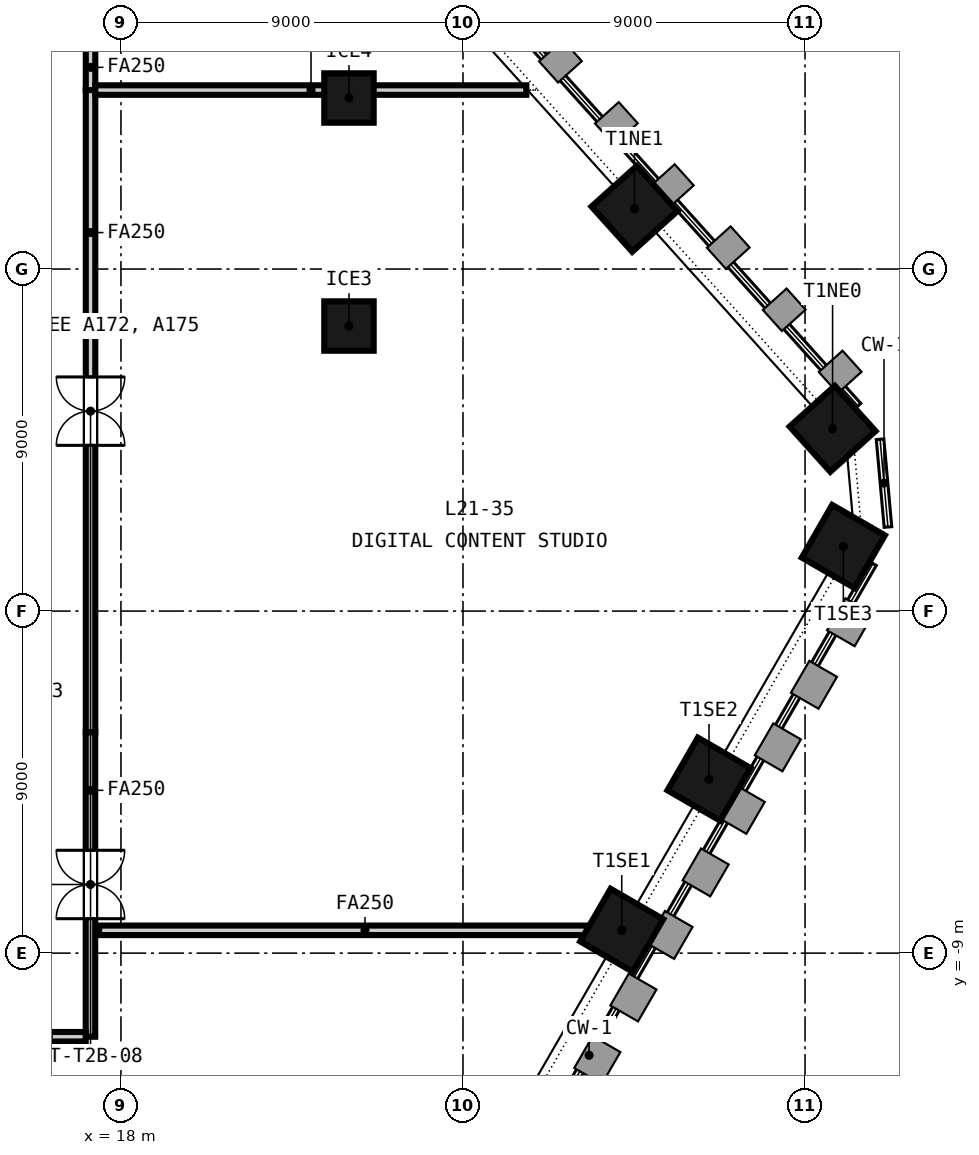
"""IFC4 building model, lengths in metres.
Left out: names, types, materials, properties, quantities, classifications, styles, units other than length and angle.
Written with IfcOpenShell. Run it as: python <this file> out.ifc"""

import sys

from ifc_helpers import new_model, si_unit, direction, frame, frame_2d, origin, origin_2d, place, context, subcontext, project, spatial, rectangle, extrude, element, fill, save


model = new_model("IFC4")
c1 = context("Model", 3, precision=1e-05, world=origin(), true_north=direction((0.0, 1.0)))
c2 = subcontext(c1, "Body", "Model", "MODEL_VIEW")
j1 = project(units=[si_unit("LENGTHUNIT", "METRE"), si_unit("PLANEANGLEUNIT", "RADIAN")], contexts=[c1])
p1 = place(None, origin())
s1 = spatial("IfcSite", under=j1, at=p1, CompositionType="ELEMENT")
p2 = place(p1, origin())
s2 = spatial("IfcBuilding", under=s1, at=p2, CompositionType="ELEMENT")
p3 = place(p2, frame((0.0, 0.0, 91.6)))
s3 = spatial("IfcBuildingStorey", under=s2, at=p3, CompositionType="ELEMENT", Elevation=91.6)
for number, where, z_axis, x_axis in (
    (1, (31.177, -8.4, -0.15), (0.0, 0.0, 1.0), (0.5, 0.866, 0.0)),
    (2, (33.473, -4.422, -0.15), (0.0, 0.0, 1.0), (0.5, 0.866, 0.0)),
    (3, (37.008, 1.7, -0.15), (0.0, 0.0, 1.0), (0.5, 0.866, 0.0)),
    (4, (36.725, 4.795, -0.15), (0.0, 0.0, 1.0), (-0.669, 0.743, 0.0)),
    (5, (31.513, 10.584, -0.15), (0.0, 0.0, 1.0), (-0.669, 0.743, 0.0)),
):
    element("IfcColumn", number, at=place(p3, frame(where, z_axis=z_axis, x_axis=x_axis)), inside=s3, PredefinedType="COLUMN", context=c2, shape_type="SweptSolid", body=[
        extrude(rectangle(XDim=1.6, YDim=1.6, at=origin_2d()), origin(), (0.0, 0.0, 1.0), 3.65),
    ])
for number, where, z_axis, x_axis in (
    (6, (24.0, 7.5, -0.15), (0.0, 0.0, 1.0), (1.0, 0.0, 0.0)),
    (7, (24.0, 13.5, -0.15), (0.0, 0.0, 1.0), (1.0, 0.0, 0.0)),
):
    element("IfcColumn", number, at=place(p3, frame(where, z_axis=z_axis, x_axis=x_axis)), inside=s3, PredefinedType="COLUMN", context=c2, shape_type="SweptSolid", body=[
        extrude(rectangle(XDim=1.3, YDim=1.3, at=origin_2d()), origin(), (0.0, 0.0, 1.0), 3.65),
    ])
p4 = place(p3, frame((17.2, 18.0, 0.0), z_axis=(0.0, 0.0, 1.0), x_axis=(0.0, -1.0, 0.0)))
e8 = element("IfcWall", 8, at=p4, inside=s3, PredefinedType="PARTITIONING", context=c2, shape_type="SweptSolid", body=[
    extrude(rectangle(XDim=4.291, YDim=0.25, at=frame_2d((2.146, 0.0))), origin(), (0.0, 0.0, 1.0), 2.741),
])
p5 = place(p4, frame((1.246, 0.0, 0.0)))
e9 = element("IfcOpeningElement", 9, at=p5, cuts=e8, PredefinedType="OPENING", context=c2, shape_type="SweptSolid", body=[
    extrude(rectangle(XDim=1.8, YDim=2.1, at=frame_2d((0.9, 1.05))), frame((0.0, 0.135, 0.0), z_axis=(0.0, -1.0, 0.0), x_axis=(1.0, 0.0, 0.0)), (0.0, 0.0, 1.0), 0.27),
])
p6 = place(p3, frame((17.198, -3.188, 0.0), z_axis=(0.0, 0.0, 1.0), x_axis=(0.0, -1.0, 0.0)))
e10 = element("IfcWall", 10, at=p6, inside=s3, PredefinedType="PARTITIONING", context=c2, shape_type="SweptSolid", body=[
    extrude(rectangle(XDim=8.012, YDim=0.25, at=frame_2d((4.006, 0.0))), origin(), (0.0, 0.0, 1.0), 2.741),
])
p7 = place(p6, frame((3.106, 0.0, 0.0)))
e11 = element("IfcOpeningElement", 11, at=p7, cuts=e10, PredefinedType="OPENING", context=c2, shape_type="SweptSolid", body=[
    extrude(rectangle(XDim=1.8, YDim=2.1, at=frame_2d((0.9, 1.05))), frame((0.0, 0.135, 0.0), z_axis=(0.0, -1.0, 0.0), x_axis=(1.0, 0.0, 0.0)), (0.0, 0.0, 1.0), 0.27),
])
p8 = place(p3, frame((17.2, 13.709, 0.0), z_axis=(0.0, 0.0, 1.0), x_axis=(0.0, -1.0, 0.0)))
e12 = element("IfcWall", 12, at=p8, inside=s3, PredefinedType="PARTITIONING", context=c2, shape_type="SweptSolid", body=[
    extrude(rectangle(XDim=16.897, YDim=0.25, at=frame_2d((8.448, 0.0))), origin(), (0.0, 0.0, 1.0), 2.741),
])
p9 = place(p8, frame((7.549, 0.0, 0.0)))
e13 = element("IfcOpeningElement", 13, at=p9, cuts=e12, PredefinedType="OPENING", context=c2, shape_type="SweptSolid", body=[
    extrude(rectangle(XDim=1.8, YDim=2.1, at=frame_2d((0.9, 1.05))), frame((0.0, 0.135, 0.0), z_axis=(0.0, -1.0, 0.0), x_axis=(1.0, 0.0, 0.0)), (0.0, 0.0, 1.0), 0.27),
])
p10 = place(p3, frame((17.073, -11.2, 0.0), z_axis=(0.0, 0.0, 1.0), x_axis=(-1.0, 0.0, 0.0)))
e14 = element("IfcWall", 14, at=p10, inside=s3, PredefinedType="PARTITIONING", context=c2, shape_type="SweptSolid", body=[
    extrude(rectangle(XDim=1.973, YDim=0.25, at=frame_2d((0.986, 0.0))), origin(), (0.0, 0.0, 1.0), 2.741),
])
p11 = place(p3, frame((17.325, 13.709, 0.0), z_axis=(0.0, 0.0, 1.0), x_axis=(1.0, 0.0, 0.0)))
e15 = element("IfcWall", 15, at=p11, inside=s3, PredefinedType="PARTITIONING", context=c2, shape_type="SweptSolid", body=[
    extrude(rectangle(XDim=11.343, YDim=0.25, at=frame_2d((5.671, 0.0))), origin(), (0.0, 0.0, 1.0), 2.741),
])
p12 = place(p3, frame((17.425, -8.4, 0.0), z_axis=(0.0, 0.0, 1.0), x_axis=(1.0, 0.0, 0.0)))
e16 = element("IfcWall", 16, at=p12, inside=s3, PredefinedType="PARTITIONING", context=c2, shape_type="SweptSolid", body=[
    extrude(rectangle(XDim=13.983, YDim=0.25, at=frame_2d((6.991, 0.0))), origin(), (0.0, 0.0, 1.0), 2.741),
])
p13 = place(p9, origin())
e17 = element("IfcDoor", 17, at=p13, inside=s3, OperationType="DOUBLE_DOOR_DOUBLE_SWING", PredefinedType="DOOR", context=c2, shape_type="SweptSolid", body=[
    extrude(rectangle(XDim=1.8, YDim=2.1, at=frame_2d((0.9, 1.05))), frame((0.0, 0.025, 0.0), z_axis=(0.0, -1.0, 0.0), x_axis=(1.0, 0.0, 0.0)), (0.0, 0.0, 1.0), 0.05),
])
fill(e13, e17)
p14 = place(p7, origin())
e18 = element("IfcDoor", 18, at=p14, inside=s3, OperationType="DOUBLE_DOOR_DOUBLE_SWING", PredefinedType="DOOR", context=c2, shape_type="SweptSolid", body=[
    extrude(rectangle(XDim=1.8, YDim=2.1, at=frame_2d((0.9, 1.05))), frame((0.0, 0.025, 0.0), z_axis=(0.0, -1.0, 0.0), x_axis=(1.0, 0.0, 0.0)), (0.0, 0.0, 1.0), 0.05),
])
fill(e11, e18)
save(model, sys.argv[1])
